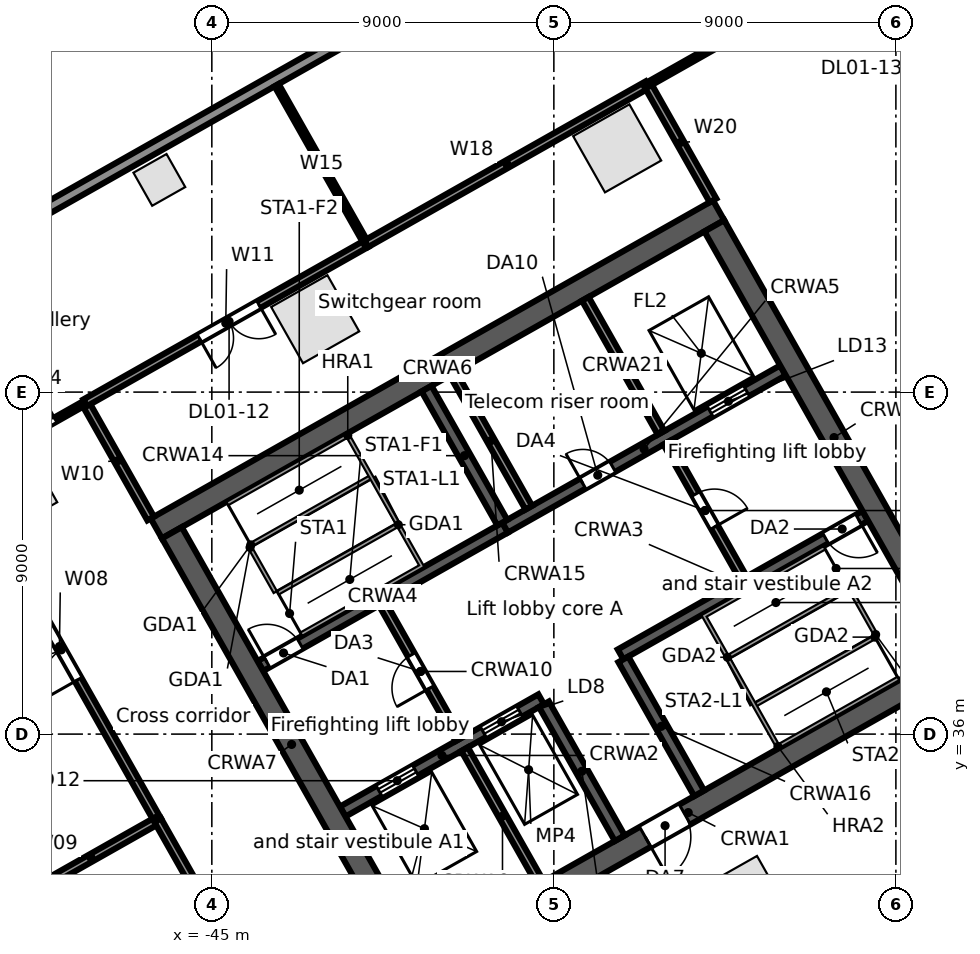
"""IFC4 building model, lengths in metres.
Left out: names, types, materials, properties, quantities, classifications, styles, units other than length and angle.
Written with IfcOpenShell. Run it as: python <this file> out.ifc"""

import sys

from ifc_helpers import new_model, si_unit, direction, frame, frame_2d, origin, origin_2d, place, context, subcontext, project, spatial, rectangle, extrude, element, fill, save


model = new_model("IFC4")
c1 = context("Model", 3, precision=1e-05, world=origin(), true_north=direction((0.0, 1.0)))
c2 = subcontext(c1, "Body", "Model", "MODEL_VIEW")
j1 = project(units=[si_unit("LENGTHUNIT", "METRE"), si_unit("PLANEANGLEUNIT", "RADIAN")], contexts=[c1])
p1 = place(None, origin())
s1 = spatial("IfcSite", under=j1, at=p1, CompositionType="ELEMENT")
p2 = place(p1, origin())
s2 = spatial("IfcBuilding", under=s1, at=p2, CompositionType="ELEMENT")
p3 = place(p2, frame((0.0, 0.0, 11.5)))
s3 = spatial("IfcBuildingStorey", under=s2, at=p3, CompositionType="ELEMENT", Elevation=11.5)
for number, where, z_axis, x_axis in (
    (1, (-34.334, 51.414, 0.0), (0.0, 0.0, 1.0), (-0.87, -0.492, 0.0)),
    (2, (-42.28, 46.919, 0.0), (0.0, 0.0, 1.0), (-0.87, -0.492, 0.0)),
    (3, (-50.226, 42.423, 0.0), (0.0, 0.0, 1.0), (-0.87, -0.492, 0.0)),
    (4, (-30.976, 31.635, 0.0), (0.0, 0.0, 1.0), (0.87, 0.492, 0.0)),
):
    element("IfcColumn", number, at=place(p3, frame(where, z_axis=z_axis, x_axis=x_axis)), inside=s3, PredefinedType="COLUMN", context=c2, shape_type="SweptSolid", body=[
        extrude(rectangle(XDim=1.7, YDim=1.7, at=origin_2d()), origin(), (0.0, 0.0, 1.0), 5.0),
    ])
p4 = place(p3, frame((-46.381, 50.584, 0.0), z_axis=(0.0, 0.0, 1.0), x_axis=(-0.87035569594, -0.492423560103, 0.0)))
e5 = element("IfcColumn", 5, at=p4, inside=s3, PredefinedType="COLUMN", context=c2, shape_type="SweptSolid", body=[
    extrude(rectangle(XDim=1.0, YDim=1.0, at=origin_2d()), origin(), (0.0, 0.0, 1.0), 5.0),
])
p5 = place(p3, frame((-63.707, 41.701, 0.0), z_axis=(0.0, 0.0, 1.0), x_axis=(0.870355510268, 0.492423888277, 0.0)))
e6 = element("IfcWall", 6, at=p5, inside=s3, PredefinedType="STANDARD", context=c2, shape_type="SweptSolid", body=[
    extrude(rectangle(XDim=67.903, YDim=0.3, at=frame_2d((33.952, 0.0))), origin(), (0.0, 0.0, 1.0), 4.65),
])
p6 = place(p3, frame((-45.526, 21.522, 0.0), z_axis=(0.0, 0.0, 1.0), x_axis=(-0.857164837164, 0.515042174903, 0.0)))
e7 = element("IfcWall", 7, at=p6, inside=s3, PredefinedType="STANDARD", context=c2, shape_type="SweptSolid", body=[
    extrude(rectangle(XDim=21.35, YDim=0.3, at=frame_2d((10.675, 0.0))), origin(), (0.0, 0.0, 1.0), 4.65),
])
p7 = place(p3, frame((-39.862, 29.749, 0.0), z_axis=(0.0, 0.0, 1.0), x_axis=(0.870350116061, 0.492433422375, 0.0)))
e8 = element("IfcWall", 8, at=p7, inside=s3, PredefinedType="SOLIDWALL", context=c2, shape_type="SweptSolid", body=[
    extrude(rectangle(XDim=17.0, YDim=0.6, at=frame_2d((8.5, 0.0))), origin(), (0.0, 0.0, 1.0), 4.65),
])
p8 = place(p7, frame((7.2, 0.0, 0.0)))
e9 = element("IfcOpeningElement", 9, at=p8, cuts=e8, PredefinedType="OPENING", context=c2, shape_type="SweptSolid", body=[
    extrude(rectangle(XDim=1.2, YDim=2.1, at=frame_2d((0.6, 1.05))), frame((0.0, 0.31, 0.0), z_axis=(0.0, -1.0, 0.0), x_axis=(1.0, 0.0, 0.0)), (0.0, 0.0, 1.0), 0.62),
])
p9 = place(p3, frame((-41.556, 33.961, 0.0), z_axis=(0.0, 0.0, 1.0), x_axis=(0.870343731308, 0.492444706919, 0.0)))
e10 = element("IfcWall", 10, at=p9, inside=s3, PredefinedType="SOLIDWALL", context=c2, shape_type="SweptSolid", body=[
    extrude(rectangle(XDim=6.0, YDim=0.3, at=frame_2d((3.0, 0.0))), origin(), (0.0, 0.0, 1.0), 4.65),
])
p10 = place(p9, frame((1.1, 0.0, 0.0)))
e11 = element("IfcOpeningElement", 11, at=p10, cuts=e10, PredefinedType="OPENING", context=c2, shape_type="SweptSolid", body=[
    extrude(rectangle(XDim=1.1, YDim=2.1, at=frame_2d((0.55, 1.05))), frame((0.0, 0.16, 0.0), z_axis=(0.0, -1.0, 0.0), x_axis=(1.0, 0.0, 0.0)), (0.0, 0.0, 1.0), 0.32),
])
p11 = place(p9, frame((4.25, 0.0, 0.0)))
e12 = element("IfcOpeningElement", 12, at=p11, cuts=e10, PredefinedType="OPENING", context=c2, shape_type="SweptSolid", body=[
    extrude(rectangle(XDim=1.1, YDim=2.1, at=frame_2d((0.55, 1.05))), frame((0.0, 0.16, 0.0), z_axis=(0.0, -1.0, 0.0), x_axis=(1.0, 0.0, 0.0)), (0.0, 0.0, 1.0), 0.32),
])
p12 = place(p3, frame((-34.245, 38.097, 0.0), z_axis=(0.0, 0.0, 1.0), x_axis=(0.870364910201, 0.492407273597, 0.0)))
e13 = element("IfcWall", 13, at=p12, inside=s3, PredefinedType="SOLIDWALL", context=c2, shape_type="SweptSolid", body=[
    extrude(rectangle(XDim=7.4, YDim=0.3, at=frame_2d((3.7, 0.0))), origin(), (0.0, 0.0, 1.0), 4.65),
])
p13 = place(p12, frame((6.2, 0.0, 0.0)))
e14 = element("IfcOpeningElement", 14, at=p13, cuts=e13, PredefinedType="OPENING", context=c2, shape_type="SweptSolid", body=[
    extrude(rectangle(XDim=1.0, YDim=2.1, at=frame_2d((0.5, 1.05))), frame((0.0, 0.16, 0.0), z_axis=(0.0, -1.0, 0.0), x_axis=(1.0, 0.0, 0.0)), (0.0, 0.0, 1.0), 0.32),
])
p14 = place(p3, frame((-43.723, 37.791, 0.0), z_axis=(0.0, 0.0, 1.0), x_axis=(0.87035077051, 0.49243226567, 0.0)))
e15 = element("IfcWall", 15, at=p14, inside=s3, PredefinedType="SOLIDWALL", context=c2, shape_type="SweptSolid", body=[
    extrude(rectangle(XDim=7.4, YDim=0.3, at=frame_2d((3.7, 0.0))), origin(), (0.0, 0.0, 1.0), 4.65),
])
p15 = place(p14, frame((0.2, 0.0, 0.0)))
e16 = element("IfcOpeningElement", 16, at=p15, cuts=e15, PredefinedType="OPENING", context=c2, shape_type="SweptSolid", body=[
    extrude(rectangle(XDim=1.0, YDim=2.1, at=frame_2d((0.5, 1.05))), frame((0.0, 0.16, 0.0), z_axis=(0.0, -1.0, 0.0), x_axis=(1.0, 0.0, 0.0)), (0.0, 0.0, 1.0), 0.32),
])
p16 = place(p3, frame((-37.282, 41.435, 0.0), z_axis=(0.0, 0.0, 1.0), x_axis=(0.870356516133, 0.492422110414, 0.0)))
e17 = element("IfcWall", 17, at=p16, inside=s3, PredefinedType="SOLIDWALL", context=c2, shape_type="SweptSolid", body=[
    extrude(rectangle(XDim=8.4, YDim=0.3, at=frame_2d((4.2, 0.0))), origin(), (0.0, 0.0, 1.0), 4.65),
])
p17 = place(p16, frame((6.2, 0.0, 0.0)))
e18 = element("IfcOpeningElement", 18, at=p17, cuts=e17, PredefinedType="OPENING", context=c2, shape_type="SweptSolid", body=[
    extrude(rectangle(XDim=1.1, YDim=2.1, at=frame_2d((0.55, 1.05))), frame((0.0, 0.16, 0.0), z_axis=(0.0, -1.0, 0.0), x_axis=(1.0, 0.0, 0.0)), (0.0, 0.0, 1.0), 0.32),
])
p18 = place(p16, frame((2.35, 0.0, 0.0)))
e19 = element("IfcOpeningElement", 19, at=p18, cuts=e17, PredefinedType="OPENING", context=c2, shape_type="SweptSolid", body=[
    extrude(rectangle(XDim=0.9, YDim=2.1, at=frame_2d((0.45, 1.05))), frame((0.0, 0.16, 0.0), z_axis=(0.0, -1.0, 0.0), x_axis=(1.0, 0.0, 0.0)), (0.0, 0.0, 1.0), 0.32),
])
p19 = place(p3, frame((-46.461, 41.412, 0.0), z_axis=(0.0, 0.0, 1.0), x_axis=(0.870350116061, 0.492433422375, 0.0)))
e20 = element("IfcWall", 20, at=p19, inside=s3, PredefinedType="SOLIDWALL", context=c2, shape_type="SweptSolid", body=[
    extrude(rectangle(XDim=17.0, YDim=0.6, at=frame_2d((8.5, 0.0))), origin(), (0.0, 0.0, 1.0), 4.65),
])
p20 = place(p3, frame((-46.052, 41.298, 0.0), z_axis=(0.0, 0.0, 1.0), x_axis=(0.492418598281, -0.870358503186, 0.0)))
e21 = element("IfcWall", 21, at=p20, inside=s3, PredefinedType="SOLIDWALL", context=c2, shape_type="SweptSolid", body=[
    extrude(rectangle(XDim=12.8, YDim=0.6, at=frame_2d((6.4, 0.0))), origin(), (0.0, 0.0, 1.0), 4.65),
])
p21 = place(p3, frame((-38.349, 35.603, 0.0), z_axis=(0.0, 0.0, 1.0), x_axis=(0.49241474071, -0.870360685654, 0.0)))
e22 = element("IfcWall", 22, at=p21, inside=s3, PredefinedType="SOLIDWALL", context=c2, shape_type="SweptSolid", body=[
    extrude(rectangle(XDim=4.05, YDim=0.2, at=frame_2d((2.025, 0.0))), origin(), (0.0, 0.0, 1.0), 4.65),
])
p22 = place(p3, frame((-40.516, 39.433, 0.0), z_axis=(0.0, 0.0, 1.0), x_axis=(0.492453559952, -0.87033872216, 0.0)))
e23 = element("IfcWall", 23, at=p22, inside=s3, PredefinedType="PARTITIONING", context=c2, shape_type="SweptSolid", body=[
    extrude(rectangle(XDim=4.1, YDim=0.2, at=frame_2d((2.05, 0.0))), origin(), (0.0, 0.0, 1.0), 4.65),
])
p23 = place(p22, frame((1.55, 0.0, 0.0)))
e24 = element("IfcOpeningElement", 24, at=p23, cuts=e23, PredefinedType="OPENING", context=c2, shape_type="SweptSolid", body=[
    extrude(rectangle(XDim=1.0, YDim=2.1, at=frame_2d((0.5, 1.05))), frame((0.0, 0.11, 0.0), z_axis=(0.0, -1.0, 0.0), x_axis=(1.0, 0.0, 0.0)), (0.0, 0.0, 1.0), 0.22),
])
p24 = place(p3, frame((-36.26, 36.785, 0.0), z_axis=(0.0, 0.0, 1.0), x_axis=(0.492440575896, -0.870346068648, 0.0)))
e25 = element("IfcWall", 25, at=p24, inside=s3, PredefinedType="SOLIDWALL", context=c2, shape_type="SweptSolid", body=[
    extrude(rectangle(XDim=4.05, YDim=0.3, at=frame_2d((2.025, 0.0))), origin(), (0.0, 0.0, 1.0), 4.65),
])
p25 = place(p3, frame((-39.35, 45.09, 0.0), z_axis=(0.0, 0.0, 1.0), x_axis=(0.49241474071, -0.870360685654, 0.0)))
e26 = element("IfcWall", 26, at=p25, inside=s3, PredefinedType="SOLIDWALL", context=c2, shape_type="SweptSolid", body=[
    extrude(rectangle(XDim=4.05, YDim=0.3, at=frame_2d((2.025, 0.0))), origin(), (0.0, 0.0, 1.0), 4.65),
])
p26 = place(p3, frame((-38.654, 45.484, 0.0), z_axis=(0.0, 0.0, 1.0), x_axis=(0.492440575896, -0.870346068648, 0.0)))
e27 = element("IfcWall", 27, at=p26, inside=s3, PredefinedType="SOLIDWALL", context=c2, shape_type="SweptSolid", body=[
    extrude(rectangle(XDim=4.05, YDim=0.2, at=frame_2d((2.025, 0.0))), origin(), (0.0, 0.0, 1.0), 4.65),
])
p27 = place(p3, frame((-34.171, 37.967, 0.0), z_axis=(0.0, 0.0, 1.0), x_axis=(0.492394910396, -0.870371904542, 0.0)))
e28 = element("IfcWall", 28, at=p27, inside=s3, PredefinedType="SOLIDWALL", context=c2, shape_type="SweptSolid", body=[
    extrude(rectangle(XDim=4.05, YDim=0.3, at=frame_2d((2.025, 0.0))), origin(), (0.0, 0.0, 1.0), 4.65),
])
p28 = place(p3, frame((-33.031, 43.667, 0.0), z_axis=(0.0, 0.0, 1.0), x_axis=(0.492408451753, -0.87036424366, 0.0)))
e29 = element("IfcWall", 29, at=p28, inside=s3, PredefinedType="PARTITIONING", context=c2, shape_type="SweptSolid", body=[
    extrude(rectangle(XDim=4.1, YDim=0.2, at=frame_2d((2.05, 0.0))), origin(), (0.0, 0.0, 1.0), 4.65),
])
p29 = place(p28, frame((1.55, 0.0, 0.0)))
e30 = element("IfcOpeningElement", 30, at=p29, cuts=e29, PredefinedType="OPENING", context=c2, shape_type="SweptSolid", body=[
    extrude(rectangle(XDim=1.0, YDim=2.1, at=frame_2d((0.5, 1.05))), frame((0.0, 0.11, 0.0), z_axis=(0.0, -1.0, 0.0), x_axis=(1.0, 0.0, 0.0)), (0.0, 0.0, 1.0), 0.22),
])
p30 = place(p3, frame((-35.173, 47.454, 0.0), z_axis=(0.0, 0.0, 1.0), x_axis=(0.492440575896, -0.870346068648, 0.0)))
e31 = element("IfcWall", 31, at=p30, inside=s3, PredefinedType="SOLIDWALL", context=c2, shape_type="SweptSolid", body=[
    extrude(rectangle(XDim=4.05, YDim=0.2, at=frame_2d((2.025, 0.0))), origin(), (0.0, 0.0, 1.0), 4.65),
])
p31 = place(p3, frame((-31.778, 49.374, 0.0), z_axis=(0.0, 0.0, 1.0), x_axis=(0.492433046652, -0.870350328641, 0.0)))
e32 = element("IfcWall", 32, at=p31, inside=s3, PredefinedType="SOLIDWALL", context=c2, shape_type="SweptSolid", body=[
    extrude(rectangle(XDim=12.8, YDim=0.6, at=frame_2d((6.4, 0.0))), origin(), (0.0, 0.0, 1.0), 4.65),
])
p32 = place(p3, frame((-51.596, 42.873, 0.0), z_axis=(0.0, 0.0, 1.0), x_axis=(0.87043427122, 0.492284652905, 0.0)))
e33 = element("IfcWall", 33, at=p32, inside=s3, PredefinedType="PARTITIONING", context=c2, shape_type="SweptSolid", body=[
    extrude(rectangle(XDim=3.75, YDim=0.125, at=frame_2d((1.875, 0.0))), origin(), (0.0, 0.0, 1.0), 4.65),
])
p33 = place(p32, frame((1.95, 0.0, 0.0)))
e34 = element("IfcOpeningElement", 34, at=p33, cuts=e33, PredefinedType="OPENING", context=c2, shape_type="SweptSolid", body=[
    extrude(rectangle(XDim=0.9, YDim=2.1, at=frame_2d((0.45, 1.05))), frame((0.0, 0.073, 0.0), z_axis=(0.0, -1.0, 0.0), x_axis=(1.0, 0.0, 0.0)), (0.0, 0.0, 1.0), 0.145),
])
p34 = place(p3, frame((-51.596, 42.873, 0.0), z_axis=(0.0, 0.0, 1.0), x_axis=(0.492438738815, -0.870347108064, 0.0)))
e35 = element("IfcWall", 35, at=p34, inside=s3, PredefinedType="PARTITIONING", context=c2, shape_type="SweptSolid", body=[
    extrude(rectangle(XDim=10.5, YDim=0.2, at=frame_2d((5.25, 0.0))), origin(), (0.0, 0.0, 1.0), 3.712),
])
p35 = place(p34, frame((4.45, 0.0, 0.0)))
e36 = element("IfcOpeningElement", 36, at=p35, cuts=e35, PredefinedType="OPENING", context=c2, shape_type="SweptSolid", body=[
    extrude(rectangle(XDim=1.8, YDim=2.1, at=frame_2d((0.9, 1.05))), frame((0.0, 0.11, 0.0), z_axis=(0.0, -1.0, 0.0), x_axis=(1.0, 0.0, 0.0)), (0.0, 0.0, 1.0), 0.22),
])
p36 = place(p3, frame((-49.928, 31.752, 0.0), z_axis=(0.0, 0.0, 1.0), x_axis=(0.870348099826, 0.492436985948, 0.0)))
e37 = element("IfcWall", 37, at=p36, inside=s3, PredefinedType="PARTITIONING", context=c2, shape_type="SweptSolid", body=[
    extrude(rectangle(XDim=4.025, YDim=0.2, at=frame_2d((2.012, 0.0))), origin(), (0.0, 0.0, 1.0), 4.65),
])
p37 = place(p3, frame((-48.332, 44.719, 0.0), z_axis=(0.0, 0.0, 1.0), x_axis=(0.492392845909, -0.87037307248, 0.0)))
e38 = element("IfcWall", 38, at=p37, inside=s3, PredefinedType="PARTITIONING", context=c2, shape_type="SweptSolid", body=[
    extrude(rectangle(XDim=3.5, YDim=0.2, at=frame_2d((1.75, 0.0))), origin(), (0.0, 0.0, 1.0), 3.93),
])
p38 = place(p3, frame((-48.332, 44.719, 0.0), z_axis=(0.0, 0.0, 1.0), x_axis=(0.870331650579, 0.492466057713, 0.0)))
e39 = element("IfcWall", 39, at=p38, inside=s3, PredefinedType="PARTITIONING", context=c2, shape_type="SweptSolid", body=[
    extrude(rectangle(XDim=8.5, YDim=0.2, at=frame_2d((4.25, 0.0))), origin(), (0.0, 0.0, 1.0), 4.03),
])
p39 = place(p38, frame((3.45, 0.0, 0.0)))
e40 = element("IfcOpeningElement", 40, at=p39, cuts=e39, PredefinedType="OPENING", context=c2, shape_type="SweptSolid", body=[
    extrude(rectangle(XDim=1.8, YDim=2.1, at=frame_2d((0.9, 1.05))), frame((0.0, 0.11, 0.0), z_axis=(0.0, -1.0, 0.0), x_axis=(1.0, 0.0, 0.0)), (0.0, 0.0, 1.0), 0.22),
])
p40 = place(p3, frame((-46.425, 33.734, 0.0), z_axis=(0.0, 0.0, 1.0), x_axis=(0.492427267353, -0.870353598469, 0.0)))
e41 = element("IfcWall", 41, at=p40, inside=s3, PredefinedType="PARTITIONING", context=c2, shape_type="SweptSolid", body=[
    extrude(rectangle(XDim=5.0, YDim=0.2, at=frame_2d((2.5, 0.0))), origin(), (0.0, 0.0, 1.0), 4.65),
])
p41 = place(p3, frame((-43.295, 53.077, 0.0), z_axis=(0.0, 0.0, 1.0), x_axis=(0.492503605136, -0.87031040378, 0.0)))
e42 = element("IfcWall", 42, at=p41, inside=s3, PredefinedType="PARTITIONING", context=c2, shape_type="SweptSolid", body=[
    extrude(rectangle(XDim=4.793, YDim=0.125, at=frame_2d((2.397, 0.0))), origin(), (0.0, 0.0, 1.0), 3.93),
])
p42 = place(p3, frame((-40.934, 48.905, 0.0), z_axis=(0.0, 0.0, 1.0), x_axis=(0.870387854278, 0.492366716102, 0.0)))
e43 = element("IfcWall", 43, at=p42, inside=s3, PredefinedType="PARTITIONING", context=c2, shape_type="SweptSolid", body=[
    extrude(rectangle(XDim=8.5, YDim=0.2, at=frame_2d((4.25, 0.0))), origin(), (0.0, 0.0, 1.0), 4.03),
])
p43 = place(p3, frame((-33.536, 53.09, 0.0), z_axis=(0.0, 0.0, 1.0), x_axis=(0.492521469645, -0.870300294116, 0.0)))
e44 = element("IfcWall", 44, at=p43, inside=s3, PredefinedType="PARTITIONING", context=c2, shape_type="SweptSolid", body=[
    extrude(rectangle(XDim=3.5, YDim=0.2, at=frame_2d((1.75, 0.0))), origin(), (0.0, 0.0, 1.0), 3.93),
])
p44 = place(p3, frame((-33.536, 53.09, 0.0), z_axis=(0.0, 0.0, 1.0), x_axis=(0.870327439455, 0.492473499928, 0.0)))
e45 = element("IfcWall", 45, at=p44, inside=s3, PredefinedType="PARTITIONING", context=c2, shape_type="SweptSolid", body=[
    extrude(rectangle(XDim=8.0, YDim=0.125, at=frame_2d((4.0, 0.0))), origin(), (0.0, 0.0, 1.0), 3.712),
])
p45 = place(p44, frame((3.45, 0.0, 0.0)))
e46 = element("IfcOpeningElement", 46, at=p45, cuts=e45, PredefinedType="OPENING", context=c2, shape_type="SweptSolid", body=[
    extrude(rectangle(XDim=0.9, YDim=2.1, at=frame_2d((0.45, 1.05))), frame((0.0, 0.073, 0.0), z_axis=(0.0, -1.0, 0.0), x_axis=(1.0, 0.0, 0.0)), (0.0, 0.0, 1.0), 0.145),
])
p46 = place(p17, origin())
e47 = element("IfcDoor", 47, at=p46, inside=s3, OperationType="DOUBLE_DOOR_SLIDING", PredefinedType="DOOR", context=c2, shape_type="SweptSolid", body=[
    extrude(rectangle(XDim=1.1, YDim=2.1, at=frame_2d((0.55, 1.05))), frame((0.0, 0.025, 0.0), z_axis=(0.0, -1.0, 0.0), x_axis=(1.0, 0.0, 0.0)), (0.0, 0.0, 1.0), 0.05),
])
fill(e18, e47)
p47 = place(p10, origin())
e48 = element("IfcDoor", 48, at=p47, inside=s3, OperationType="DOUBLE_DOOR_SLIDING", PredefinedType="DOOR", context=c2, shape_type="SweptSolid", body=[
    extrude(rectangle(XDim=1.1, YDim=2.1, at=frame_2d((0.55, 1.05))), frame((0.0, 0.025, 0.0), z_axis=(0.0, -1.0, 0.0), x_axis=(1.0, 0.0, 0.0)), (0.0, 0.0, 1.0), 0.05),
])
fill(e11, e48)
p48 = place(p11, origin())
e49 = element("IfcDoor", 49, at=p48, inside=s3, OperationType="DOUBLE_DOOR_SLIDING", PredefinedType="DOOR", context=c2, shape_type="SweptSolid", body=[
    extrude(rectangle(XDim=1.1, YDim=2.1, at=frame_2d((0.55, 1.05))), frame((0.0, 0.025, 0.0), z_axis=(0.0, -1.0, 0.0), x_axis=(1.0, 0.0, 0.0)), (0.0, 0.0, 1.0), 0.05),
])
fill(e12, e49)
p49 = place(p15, origin())
e50 = element("IfcDoor", 50, at=p49, inside=s3, OperationType="SINGLE_SWING_LEFT", PredefinedType="DOOR", context=c2, shape_type="SweptSolid", body=[
    extrude(rectangle(XDim=1.0, YDim=2.1, at=frame_2d((0.5, 1.05))), frame((0.0, 0.025, 0.0), z_axis=(0.0, -1.0, 0.0), x_axis=(1.0, 0.0, 0.0)), (0.0, 0.0, 1.0), 0.05),
])
fill(e16, e50)
p50 = place(p13, frame((1.0, 0.0, 0.0), z_axis=(0.0, 0.0, 1.0), x_axis=(-1.0, 0.0, 0.0)))
e51 = element("IfcDoor", 51, at=p50, inside=s3, OperationType="SINGLE_SWING_LEFT", PredefinedType="DOOR", context=c2, shape_type="SweptSolid", body=[
    extrude(rectangle(XDim=1.0, YDim=2.1, at=frame_2d((0.5, 1.05))), frame((0.0, 0.025, 0.0), z_axis=(0.0, -1.0, 0.0), x_axis=(1.0, 0.0, 0.0)), (0.0, 0.0, 1.0), 0.05),
])
fill(e14, e51)
p51 = place(p23, frame((1.0, 0.0, 0.0), z_axis=(0.0, 0.0, 1.0), x_axis=(-1.0, 0.0, 0.0)))
e52 = element("IfcDoor", 52, at=p51, inside=s3, OperationType="SINGLE_SWING_LEFT", PredefinedType="DOOR", context=c2, shape_type="SweptSolid", body=[
    extrude(rectangle(XDim=1.0, YDim=2.1, at=frame_2d((0.5, 1.05))), frame((0.0, 0.025, 0.0), z_axis=(0.0, -1.0, 0.0), x_axis=(1.0, 0.0, 0.0)), (0.0, 0.0, 1.0), 0.05),
])
fill(e24, e52)
p52 = place(p29, origin())
e53 = element("IfcDoor", 53, at=p52, inside=s3, OperationType="SINGLE_SWING_RIGHT", PredefinedType="DOOR", context=c2, shape_type="SweptSolid", body=[
    extrude(rectangle(XDim=1.0, YDim=2.1, at=frame_2d((0.5, 1.05))), frame((0.0, 0.025, 0.0), z_axis=(0.0, -1.0, 0.0), x_axis=(1.0, 0.0, 0.0)), (0.0, 0.0, 1.0), 0.05),
])
fill(e30, e53)
p53 = place(p8, frame((1.2, 0.0, 0.0), z_axis=(0.0, 0.0, 1.0), x_axis=(-1.0, 0.0, 0.0)))
e54 = element("IfcDoor", 54, at=p53, inside=s3, OperationType="SINGLE_SWING_RIGHT", PredefinedType="DOOR", context=c2, shape_type="SweptSolid", body=[
    extrude(rectangle(XDim=1.2, YDim=2.1, at=frame_2d((0.6, 1.05))), frame((0.0, 0.025, 0.0), z_axis=(0.0, -1.0, 0.0), x_axis=(1.0, 0.0, 0.0)), (0.0, 0.0, 1.0), 0.05),
])
fill(e9, e54)
p54 = place(p18, origin())
e55 = element("IfcDoor", 55, at=p54, inside=s3, OperationType="SINGLE_SWING_LEFT", PredefinedType="DOOR", context=c2, shape_type="SweptSolid", body=[
    extrude(rectangle(XDim=0.9, YDim=2.1, at=frame_2d((0.45, 1.05))), frame((0.0, 0.025, 0.0), z_axis=(0.0, -1.0, 0.0), x_axis=(1.0, 0.0, 0.0)), (0.0, 0.0, 1.0), 0.05),
])
fill(e19, e55)
p55 = place(p33, origin())
e56 = element("IfcDoor", 56, at=p55, inside=s3, OperationType="SINGLE_SWING_RIGHT", PredefinedType="DOOR", context=c2, shape_type="SweptSolid", body=[
    extrude(rectangle(XDim=0.9, YDim=2.1, at=frame_2d((0.45, 1.05))), frame((0.0, 0.025, 0.0), z_axis=(0.0, -1.0, 0.0), x_axis=(1.0, 0.0, 0.0)), (0.0, 0.0, 1.0), 0.05),
])
fill(e34, e56)
p56 = place(p35, frame((1.8, 0.0, 0.0), z_axis=(0.0, 0.0, 1.0), x_axis=(-1.0, 0.0, 0.0)))
e57 = element("IfcDoor", 57, at=p56, inside=s3, OperationType="DOUBLE_DOOR_SINGLE_SWING", PredefinedType="DOOR", context=c2, shape_type="SweptSolid", body=[
    extrude(rectangle(XDim=1.8, YDim=2.1, at=frame_2d((0.9, 1.05))), frame((0.0, 0.025, 0.0), z_axis=(0.0, -1.0, 0.0), x_axis=(1.0, 0.0, 0.0)), (0.0, 0.0, 1.0), 0.05),
])
fill(e36, e57)
p57 = place(p39, frame((1.8, 0.0, 0.0), z_axis=(0.0, 0.0, 1.0), x_axis=(-1.0, 0.0, 0.0)))
e58 = element("IfcDoor", 58, at=p57, inside=s3, OperationType="DOUBLE_DOOR_SINGLE_SWING", PredefinedType="DOOR", context=c2, shape_type="SweptSolid", body=[
    extrude(rectangle(XDim=1.8, YDim=2.1, at=frame_2d((0.9, 1.05))), frame((0.0, 0.025, 0.0), z_axis=(0.0, -1.0, 0.0), x_axis=(1.0, 0.0, 0.0)), (0.0, 0.0, 1.0), 0.05),
])
fill(e40, e58)
save(model, sys.argv[1])
